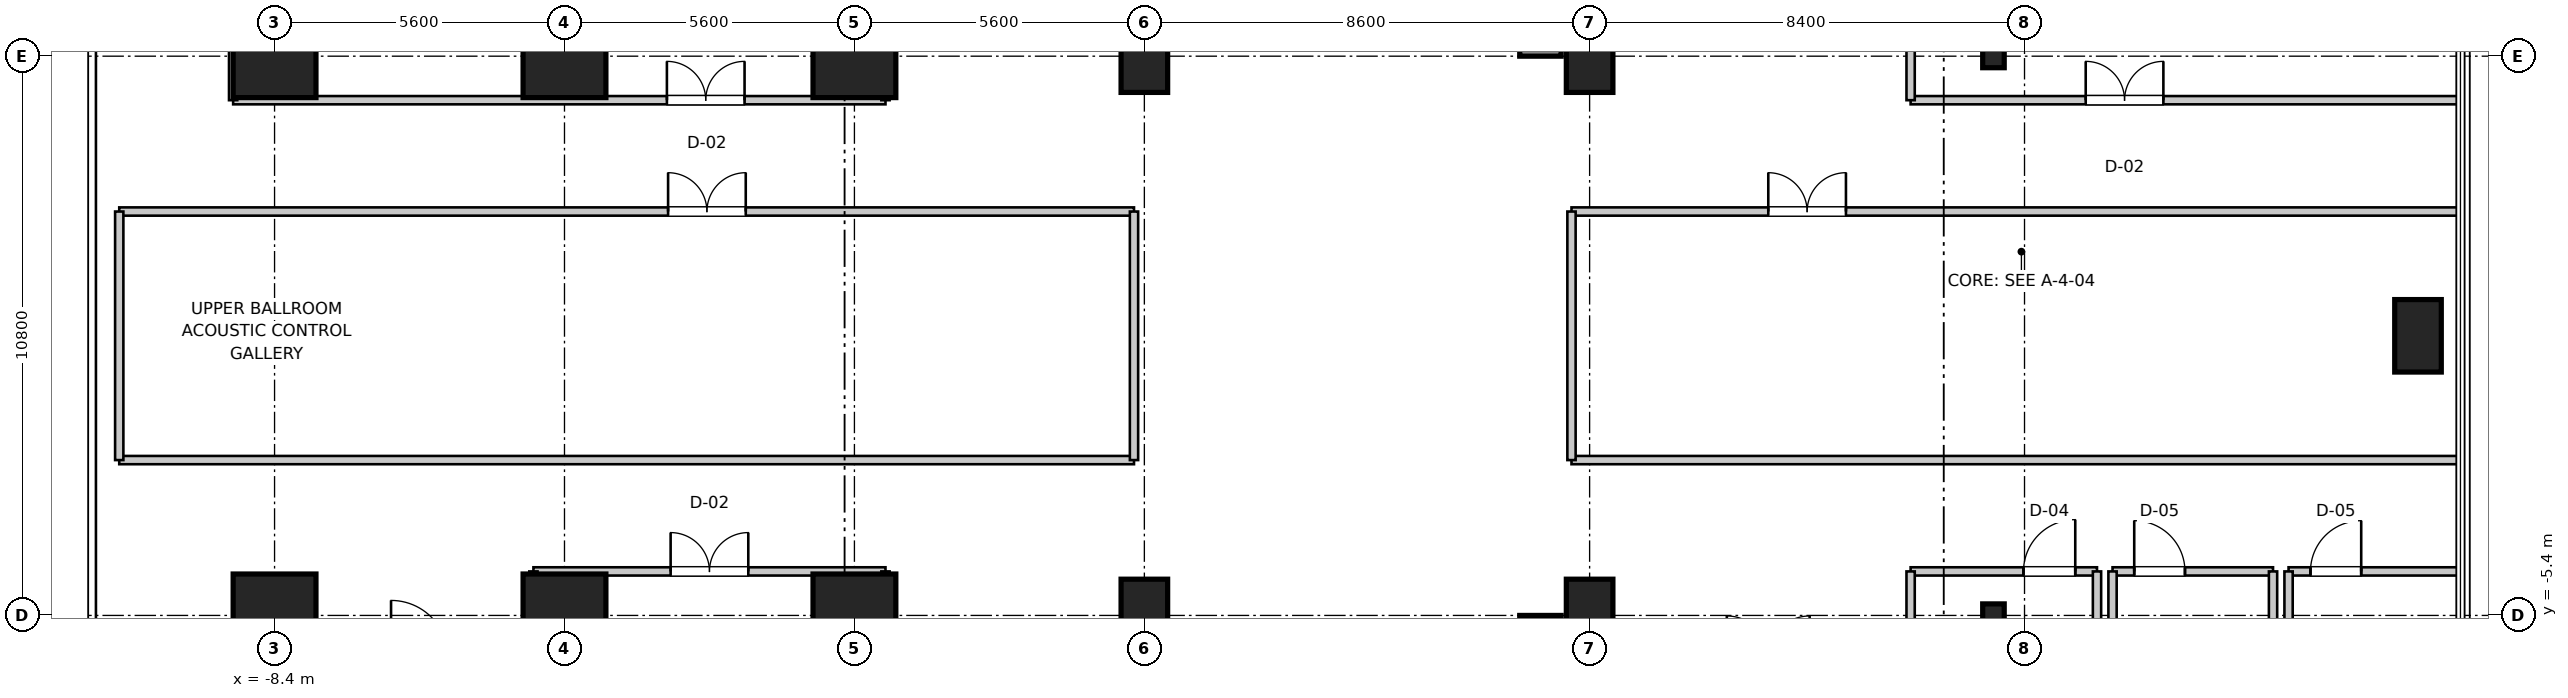
"""IFC4 building model, lengths in metres.
Left out: names, types, materials, properties, quantities, classifications, styles, units other than length and angle.
Written with IfcOpenShell. Run it as: python <this file> out.ifc"""

import sys

from ifc_helpers import new_model, si_unit, direction, frame, frame_2d, origin, origin_2d, place, context, subcontext, project, spatial, rectangle, i_section, extrude, source, transform, mapped, element, fill, save


model = new_model("IFC4")
c1 = context("Model", 3, precision=1e-05, world=origin(), true_north=direction((0.0, 1.0)))
c2 = subcontext(c1, "Body", "Model", "MODEL_VIEW")
j1 = project(units=[si_unit("LENGTHUNIT", "METRE"), si_unit("PLANEANGLEUNIT", "RADIAN")], contexts=[c1])
p1 = place(None, origin())
s1 = spatial("IfcSite", under=j1, at=p1, CompositionType="ELEMENT")
p2 = place(p1, origin())
s2 = spatial("IfcBuilding", under=s1, at=p2, CompositionType="ELEMENT")
p3 = place(p2, frame((0.0, 0.0, 21.6)))
s3 = spatial("IfcBuildingStorey", under=s2, at=p3, CompositionType="ELEMENT", Elevation=21.6)
m1 = source(origin(), c2, "Body", "SweptSolid", [
    extrude(rectangle(XDim=1.6, YDim=1.6, at=origin_2d()), origin(), (0.0, 0.0, 1.0), 5.355),
])
for number, where, z_axis, x_axis in (
    (1, (-8.4, -5.4, 0.0), (0.0, 0.0, 1.0), (1.0, 0.0, 0.0)),
    (2, (-8.4, 5.4, 0.0), (0.0, 0.0, 1.0), (1.0, 0.0, 0.0)),
    (3, (-2.8, -5.4, 0.0), (0.0, 0.0, 1.0), (1.0, 0.0, 0.0)),
    (4, (-2.8, 5.4, 0.0), (0.0, 0.0, 1.0), (1.0, 0.0, 0.0)),
    (5, (2.8, -5.4, 0.0), (0.0, 0.0, 1.0), (1.0, 0.0, 0.0)),
    (6, (2.8, 5.4, 0.0), (0.0, 0.0, 1.0), (1.0, 0.0, 0.0)),
):
    element("IfcColumn", number, at=place(p3, frame(where, z_axis=z_axis, x_axis=x_axis)), inside=s3, PredefinedType="COLUMN", context=c2, shape_type="MappedRepresentation", body=[
        mapped(m1, transform((0.0, 0.0, 0.0), scale=1.0)),
    ])
m2 = source(origin(), c2, "Body", "SweptSolid", [
    extrude(rectangle(XDim=0.9, YDim=1.4, at=origin_2d()), origin(), (0.0, 0.0, 1.0), 5.355),
])
for number, where, z_axis, x_axis in (
    (7, (8.4, -5.4, 0.0), (0.0, 0.0, 1.0), (1.0, 0.0, 0.0)),
    (8, (8.4, 5.4, 0.0), (0.0, 0.0, 1.0), (1.0, 0.0, 0.0)),
    (9, (17.0, -5.4, 0.0), (0.0, 0.0, 1.0), (1.0, 0.0, 0.0)),
    (10, (17.0, 5.4, 0.0), (0.0, 0.0, 1.0), (1.0, 0.0, 0.0)),
    (11, (33.0, 0.0, 0.0), (0.0, 0.0, 1.0), (1.0, 0.0, 0.0)),
):
    element("IfcColumn", number, at=place(p3, frame(where, z_axis=z_axis, x_axis=x_axis)), inside=s3, PredefinedType="PILASTER", context=c2, shape_type="MappedRepresentation", body=[
        mapped(m2, transform((0.0, 0.0, 0.0), scale=1.0)),
    ])
m3 = source(origin(), c2, "Body", "SweptSolid", [
    extrude(i_section(OverallWidth=0.416, OverallDepth=0.446, WebThickness=0.025, FlangeThickness=0.04, at=origin_2d()), origin(), (0.0, 0.0, 1.0), 5.255),
])
for number, where, z_axis, x_axis in (
    (12, (24.8, -5.4, 0.0), (0.0, 0.0, 1.0), (1.0, 0.0, 0.0)),
    (13, (24.8, 5.4, 0.0), (0.0, 0.0, 1.0), (1.0, 0.0, 0.0)),
):
    element("IfcColumn", number, at=place(p3, frame(where, z_axis=z_axis, x_axis=x_axis)), inside=s3, PredefinedType="COLUMN", context=c2, shape_type="MappedRepresentation", body=[
        mapped(m3, transform((0.0, 0.0, 0.0), scale=1.0)),
    ])
m4 = source(origin(), c2, "Body", "SweptSolid", [
    extrude(rectangle(XDim=11.6, YDim=0.8, at=frame_2d((5.8, 0.0))), origin(), (0.0, 0.0, 1.0), 4.98),
])
for number, where, z_axis, x_axis in (
    (14, (16.05, 5.4, 0.0), (0.0, 0.0, 1.0), (0.0, 1.0, 0.0)),
    (15, (16.05, -17.0, 0.0), (0.0, 0.0, 1.0), (0.0, 1.0, 0.0)),
):
    element("IfcWall", number, at=place(p3, frame(where, z_axis=z_axis, x_axis=x_axis)), inside=s3, PredefinedType="SHEAR", context=c2, shape_type="MappedRepresentation", body=[
        mapped(m4, transform((0.0, 0.0, 0.0), scale=1.0)),
    ])
m5 = source(origin(), c2, "Body", "SweptSolid", [
    extrude(rectangle(XDim=19.6, YDim=0.16, at=frame_2d((9.8, 0.0))), origin(), (0.0, 0.0, 1.0), 3.1),
])
p4 = place(p3, frame((-11.4, -2.4, 0.0), z_axis=(0.0, 0.0, 1.0), x_axis=(1.0, 0.0, 0.0)))
e16 = element("IfcWall", 16, at=p4, inside=s3, PredefinedType="PARTITIONING", context=c2, shape_type="MappedRepresentation", body=[
    mapped(m5, transform((0.0, 0.0, 0.0), scale=1.0)),
])
p5 = place(p3, frame((-11.4, 2.4, 0.0), z_axis=(0.0, 0.0, 1.0), x_axis=(1.0, 0.0, 0.0)))
e17 = element("IfcWall", 17, at=p5, inside=s3, PredefinedType="PARTITIONING", context=c2, shape_type="MappedRepresentation", body=[
    mapped(m5, transform((0.0, 0.0, 0.0), scale=1.0)),
])
p6 = place(p5, frame((10.601, 0.0, 0.0)))
e18 = element("IfcOpeningElement", 18, at=p6, cuts=e17, PredefinedType="OPENING", context=c2, shape_type="SweptSolid", body=[
    extrude(rectangle(XDim=1.5, YDim=2.15, at=frame_2d((0.75, 1.075))), frame((0.0, 0.09, 0.0), z_axis=(0.0, -1.0, 0.0), x_axis=(1.0, 0.0, 0.0)), (0.0, 0.0, 1.0), 0.18),
])
m6 = source(origin(), c2, "Body", "SweptSolid", [
    extrude(rectangle(XDim=4.8, YDim=0.16, at=frame_2d((2.4, 0.0))), origin(), (0.0, 0.0, 1.0), 3.1),
])
for number, where, z_axis, x_axis in (
    (19, (-11.4, -2.4, 0.0), (0.0, 0.0, 1.0), (0.0, 1.0, 0.0)),
    (20, (8.2, -2.4, 0.0), (0.0, 0.0, 1.0), (0.0, 1.0, 0.0)),
):
    element("IfcWall", number, at=place(p3, frame(where, z_axis=z_axis, x_axis=x_axis)), inside=s3, PredefinedType="PARTITIONING", context=c2, shape_type="MappedRepresentation", body=[
        mapped(m6, transform((0.0, 0.0, 0.0), scale=1.0)),
    ])
m7 = source(origin(), c2, "Body", "SweptSolid", [
    extrude(rectangle(XDim=17.11, YDim=0.16, at=frame_2d((8.555, 0.0))), origin(), (0.0, 0.0, 1.0), 3.1),
])
p7 = place(p3, frame((16.65, -2.4, 0.0), z_axis=(0.0, 0.0, 1.0), x_axis=(1.0, 0.0, 0.0)))
e21 = element("IfcWall", 21, at=p7, inside=s3, PredefinedType="PARTITIONING", context=c2, shape_type="MappedRepresentation", body=[
    mapped(m7, transform((0.0, 0.0, 0.0), scale=1.0)),
])
p8 = place(p3, frame((16.65, 2.4, 0.0), z_axis=(0.0, 0.0, 1.0), x_axis=(1.0, 0.0, 0.0)))
e22 = element("IfcWall", 22, at=p8, inside=s3, PredefinedType="PARTITIONING", context=c2, shape_type="MappedRepresentation", body=[
    mapped(m7, transform((0.0, 0.0, 0.0), scale=1.0)),
])
p9 = place(p8, frame((3.801, 0.0, 0.0)))
e23 = element("IfcOpeningElement", 23, at=p9, cuts=e22, PredefinedType="OPENING", context=c2, shape_type="SweptSolid", body=[
    extrude(rectangle(XDim=1.5, YDim=2.15, at=frame_2d((0.75, 1.075))), frame((0.0, 0.09, 0.0), z_axis=(0.0, -1.0, 0.0), x_axis=(1.0, 0.0, 0.0)), (0.0, 0.0, 1.0), 0.18),
])
p10 = place(p3, frame((16.65, -2.4, 0.0), z_axis=(0.0, 0.0, 1.0), x_axis=(0.0, 1.0, 0.0)))
e24 = element("IfcWall", 24, at=p10, inside=s3, PredefinedType="PARTITIONING", context=c2, shape_type="MappedRepresentation", body=[
    mapped(m6, transform((0.0, 0.0, 0.0), scale=1.0)),
])
m8 = source(origin(), c2, "Body", "SweptSolid", [
    extrude(rectangle(XDim=12.6, YDim=0.16, at=frame_2d((6.3, 0.0))), origin(), (0.0, 0.0, 1.0), 3.1),
])
p11 = place(p3, frame((-9.2, 4.55, 0.0), z_axis=(0.0, 0.0, 1.0), x_axis=(1.0, 0.0, 0.0)))
e25 = element("IfcWall", 25, at=p11, inside=s3, PredefinedType="PARTITIONING", context=c2, shape_type="MappedRepresentation", body=[
    mapped(m8, transform((0.0, 0.0, 0.0), scale=1.0)),
])
p12 = place(p11, frame((8.378, 0.0, 0.0)))
e26 = element("IfcOpeningElement", 26, at=p12, cuts=e25, PredefinedType="OPENING", context=c2, shape_type="SweptSolid", body=[
    extrude(rectangle(XDim=1.5, YDim=2.15, at=frame_2d((0.75, 1.075))), frame((0.0, 0.09, 0.0), z_axis=(0.0, -1.0, 0.0), x_axis=(1.0, 0.0, 0.0)), (0.0, 0.0, 1.0), 0.18),
])
m9 = source(origin(), c2, "Body", "SweptSolid", [
    extrude(rectangle(XDim=18.71, YDim=0.16, at=frame_2d((9.355, 0.0))), origin(), (0.0, 0.0, 1.0), 3.1),
])
for number, where, z_axis, x_axis in (
    (27, (-9.2, 4.55, 0.0), (0.0, 0.0, 1.0), (0.0, 1.0, 0.0)),
    (28, (3.4, 4.55, 0.0), (0.0, 0.0, 1.0), (0.0, 1.0, 0.0)),
):
    element("IfcWall", number, at=place(p3, frame(where, z_axis=z_axis, x_axis=x_axis)), inside=s3, PredefinedType="PARTITIONING", context=c2, shape_type="MappedRepresentation", body=[
        mapped(m9, transform((0.0, 0.0, 0.0), scale=1.0)),
    ])
m10 = source(origin(), c2, "Body", "SweptSolid", [
    extrude(rectangle(XDim=6.8, YDim=0.16, at=frame_2d((3.4, 0.0))), origin(), (0.0, 0.0, 1.0), 3.1),
])
p13 = place(p3, frame((-3.4, -4.55, 0.0), z_axis=(0.0, 0.0, 1.0), x_axis=(1.0, 0.0, 0.0)))
e29 = element("IfcWall", 29, at=p13, inside=s3, PredefinedType="PARTITIONING", context=c2, shape_type="MappedRepresentation", body=[
    mapped(m10, transform((0.0, 0.0, 0.0), scale=1.0)),
])
p14 = place(p13, frame((2.65, 0.0, 0.0)))
e30 = element("IfcOpeningElement", 30, at=p14, cuts=e29, PredefinedType="OPENING", context=c2, shape_type="SweptSolid", body=[
    extrude(rectangle(XDim=1.5, YDim=2.15, at=frame_2d((0.75, 1.075))), frame((0.0, 0.09, 0.0), z_axis=(0.0, -1.0, 0.0), x_axis=(1.0, 0.0, 0.0)), (0.0, 0.0, 1.0), 0.18),
])
for number, where, z_axis, x_axis in (
    (31, (-3.4, -23.26, 0.0), (0.0, 0.0, 1.0), (0.0, 1.0, 0.0)),
    (32, (3.4, -23.26, 0.0), (0.0, 0.0, 1.0), (0.0, 1.0, 0.0)),
):
    element("IfcWall", number, at=place(p3, frame(where, z_axis=z_axis, x_axis=x_axis)), inside=s3, PredefinedType="PARTITIONING", context=c2, shape_type="MappedRepresentation", body=[
        mapped(m9, transform((0.0, 0.0, 0.0), scale=1.0)),
    ])
m11 = source(origin(), c2, "Body", "SweptSolid", [
    extrude(rectangle(XDim=10.56, YDim=0.16, at=frame_2d((5.28, 0.0))), origin(), (0.0, 0.0, 1.0), 3.1),
])
p15 = place(p3, frame((23.2, 4.55, 0.0), z_axis=(0.0, 0.0, 1.0), x_axis=(1.0, 0.0, 0.0)))
e33 = element("IfcWall", 33, at=p15, inside=s3, PredefinedType="PARTITIONING", context=c2, shape_type="MappedRepresentation", body=[
    mapped(m11, transform((0.0, 0.0, 0.0), scale=1.0)),
])
p16 = place(p15, frame((3.382, 0.0, 0.0)))
e34 = element("IfcOpeningElement", 34, at=p16, cuts=e33, PredefinedType="OPENING", context=c2, shape_type="SweptSolid", body=[
    extrude(rectangle(XDim=1.5, YDim=2.15, at=frame_2d((0.75, 1.075))), frame((0.0, 0.09, 0.0), z_axis=(0.0, -1.0, 0.0), x_axis=(1.0, 0.0, 0.0)), (0.0, 0.0, 1.0), 0.18),
])
p17 = place(p3, frame((23.2, 4.55, 0.0), z_axis=(0.0, 0.0, 1.0), x_axis=(0.0, 1.0, 0.0)))
e35 = element("IfcWall", 35, at=p17, inside=s3, PredefinedType="PARTITIONING", context=c2, shape_type="MappedRepresentation", body=[
    mapped(m9, transform((0.0, 0.0, 0.0), scale=1.0)),
])
m12 = source(origin(), c2, "Body", "SweptSolid", [
    extrude(rectangle(XDim=3.6, YDim=0.16, at=frame_2d((1.8, 0.0))), origin(), (0.0, 0.0, 1.0), 3.1),
])
p18 = place(p3, frame((23.2, -4.55, 0.0), z_axis=(0.0, 0.0, 1.0), x_axis=(1.0, 0.0, 0.0)))
e36 = element("IfcWall", 36, at=p18, inside=s3, PredefinedType="PARTITIONING", context=c2, shape_type="MappedRepresentation", body=[
    mapped(m12, transform((0.0, 0.0, 0.0), scale=1.0)),
])
p19 = place(p18, frame((2.18, 0.0, 0.0)))
e37 = element("IfcOpeningElement", 37, at=p19, cuts=e36, PredefinedType="OPENING", context=c2, shape_type="SweptSolid", body=[
    extrude(rectangle(XDim=1.0, YDim=2.1, at=frame_2d((0.5, 1.05))), frame((0.0, 0.09, 0.0), z_axis=(0.0, -1.0, 0.0), x_axis=(1.0, 0.0, 0.0)), (0.0, 0.0, 1.0), 0.18),
])
for number, where, z_axis, x_axis in (
    (38, (23.2, -23.26, 0.0), (0.0, 0.0, 1.0), (0.0, 1.0, 0.0)),
    (39, (26.8, -23.26, 0.0), (0.0, 0.0, 1.0), (0.0, 1.0, 0.0)),
):
    element("IfcWall", number, at=place(p3, frame(where, z_axis=z_axis, x_axis=x_axis)), inside=s3, PredefinedType="PARTITIONING", context=c2, shape_type="MappedRepresentation", body=[
        mapped(m9, transform((0.0, 0.0, 0.0), scale=1.0)),
    ])
m13 = source(origin(), c2, "Body", "SweptSolid", [
    extrude(rectangle(XDim=3.1, YDim=0.16, at=frame_2d((1.55, 0.0))), origin(), (0.0, 0.0, 1.0), 3.1),
])
p20 = place(p3, frame((27.1, -4.55, 0.0), z_axis=(0.0, 0.0, 1.0), x_axis=(1.0, 0.0, 0.0)))
e40 = element("IfcWall", 40, at=p20, inside=s3, PredefinedType="PARTITIONING", context=c2, shape_type="MappedRepresentation", body=[
    mapped(m13, transform((0.0, 0.0, 0.0), scale=1.0)),
])
p21 = place(p20, frame((0.419, 0.0, 0.0)))
e41 = element("IfcOpeningElement", 41, at=p21, cuts=e40, PredefinedType="OPENING", context=c2, shape_type="SweptSolid", body=[
    extrude(rectangle(XDim=0.98, YDim=2.1, at=frame_2d((0.49, 1.05))), frame((0.0, 0.09, 0.0), z_axis=(0.0, -1.0, 0.0), x_axis=(1.0, 0.0, 0.0)), (0.0, 0.0, 1.0), 0.18),
])
m14 = source(origin(), c2, "Body", "SweptSolid", [
    extrude(rectangle(XDim=7.45, YDim=0.16, at=frame_2d((3.725, 0.0))), origin(), (0.0, 0.0, 1.0), 3.1),
])
for number, where, z_axis, x_axis in (
    (42, (27.1, -12.0, 0.0), (0.0, 0.0, 1.0), (0.0, 1.0, 0.0)),
    (43, (30.2, -12.0, 0.0), (0.0, 0.0, 1.0), (0.0, 1.0, 0.0)),
):
    element("IfcWall", number, at=place(p3, frame(where, z_axis=z_axis, x_axis=x_axis)), inside=s3, PredefinedType="PARTITIONING", context=c2, shape_type="MappedRepresentation", body=[
        mapped(m14, transform((0.0, 0.0, 0.0), scale=1.0)),
    ])
m15 = source(origin(), c2, "Body", "SweptSolid", [
    extrude(rectangle(XDim=3.26, YDim=0.16, at=frame_2d((1.63, 0.0))), origin(), (0.0, 0.0, 1.0), 3.1),
])
p22 = place(p3, frame((30.5, -4.55, 0.0), z_axis=(0.0, 0.0, 1.0), x_axis=(1.0, 0.0, 0.0)))
e44 = element("IfcWall", 44, at=p22, inside=s3, PredefinedType="PARTITIONING", context=c2, shape_type="MappedRepresentation", body=[
    mapped(m15, transform((0.0, 0.0, 0.0), scale=1.0)),
])
p23 = place(p22, frame((0.423, 0.0, 0.0)))
e45 = element("IfcOpeningElement", 45, at=p23, cuts=e44, PredefinedType="OPENING", context=c2, shape_type="SweptSolid", body=[
    extrude(rectangle(XDim=0.98, YDim=2.1, at=frame_2d((0.49, 1.05))), frame((0.0, 0.09, 0.0), z_axis=(0.0, -1.0, 0.0), x_axis=(1.0, 0.0, 0.0)), (0.0, 0.0, 1.0), 0.18),
])
m16 = source(origin(), c2, "Body", "SweptSolid", [
    extrude(rectangle(XDim=5.95, YDim=0.16, at=frame_2d((2.975, 0.0))), origin(), (0.0, 0.0, 1.0), 3.1),
])
p24 = place(p3, frame((30.5, -10.5, 0.0), z_axis=(0.0, 0.0, 1.0), x_axis=(0.0, 1.0, 0.0)))
e46 = element("IfcWall", 46, at=p24, inside=s3, PredefinedType="PARTITIONING", context=c2, shape_type="MappedRepresentation", body=[
    mapped(m16, transform((0.0, 0.0, 0.0), scale=1.0)),
])
m17 = source(origin(), c2, "Body", "SweptSolid", [
    extrude(rectangle(XDim=1.5, YDim=2.15, at=frame_2d((0.75, 1.075))), frame((0.0, 0.025, 0.0), z_axis=(0.0, -1.0, 0.0), x_axis=(1.0, 0.0, 0.0)), (0.0, 0.0, 1.0), 0.05),
])
p25 = place(p6, frame((1.5, 0.0, 0.0), z_axis=(0.0, 0.0, 1.0), x_axis=(-1.0, 0.0, 0.0)))
e47 = element("IfcDoor", 47, at=p25, inside=s3, OperationType="DOUBLE_DOOR_SINGLE_SWING", PredefinedType="DOOR", context=c2, shape_type="MappedRepresentation", body=[
    mapped(m17, transform((0.0, 0.0, 0.0), scale=1.0)),
])
fill(e18, e47)
p26 = place(p9, frame((1.5, 0.0, 0.0), z_axis=(0.0, 0.0, 1.0), x_axis=(-1.0, 0.0, 0.0)))
e48 = element("IfcDoor", 48, at=p26, inside=s3, OperationType="DOUBLE_DOOR_SINGLE_SWING", PredefinedType="DOOR", context=c2, shape_type="MappedRepresentation", body=[
    mapped(m17, transform((0.0, 0.0, 0.0), scale=1.0)),
])
fill(e23, e48)
p27 = place(p12, origin())
e49 = element("IfcDoor", 49, at=p27, inside=s3, OperationType="DOUBLE_DOOR_SINGLE_SWING", PredefinedType="DOOR", context=c2, shape_type="MappedRepresentation", body=[
    mapped(m17, transform((0.0, 0.0, 0.0), scale=1.0)),
])
fill(e26, e49)
p28 = place(p14, frame((1.5, 0.0, 0.0), z_axis=(0.0, 0.0, 1.0), x_axis=(-1.0, 0.0, 0.0)))
e50 = element("IfcDoor", 50, at=p28, inside=s3, OperationType="DOUBLE_DOOR_SINGLE_SWING", PredefinedType="DOOR", context=c2, shape_type="MappedRepresentation", body=[
    mapped(m17, transform((0.0, 0.0, 0.0), scale=1.0)),
])
fill(e30, e50)
p29 = place(p16, origin())
e51 = element("IfcDoor", 51, at=p29, inside=s3, OperationType="DOUBLE_DOOR_SINGLE_SWING", PredefinedType="DOOR", context=c2, shape_type="MappedRepresentation", body=[
    mapped(m17, transform((0.0, 0.0, 0.0), scale=1.0)),
])
fill(e34, e51)
m18 = source(origin(), c2, "Body", "SweptSolid", [
    extrude(rectangle(XDim=1.0, YDim=2.1, at=frame_2d((0.5, 1.05))), frame((0.0, 0.025, 0.0), z_axis=(0.0, -1.0, 0.0), x_axis=(1.0, 0.0, 0.0)), (0.0, 0.0, 1.0), 0.05),
])
p30 = place(p19, frame((1.0, 0.0, 0.0), z_axis=(0.0, 0.0, 1.0), x_axis=(-1.0, 0.0, 0.0)))
e52 = element("IfcDoor", 52, at=p30, inside=s3, OperationType="SINGLE_SWING_RIGHT", PredefinedType="DOOR", context=c2, shape_type="MappedRepresentation", body=[
    mapped(m18, transform((0.0, 0.0, 0.0), scale=1.0)),
])
fill(e37, e52)
m19 = source(origin(), c2, "Body", "SweptSolid", [
    extrude(rectangle(XDim=0.98, YDim=2.1, at=frame_2d((0.49, 1.05))), frame((0.0, 0.025, 0.0), z_axis=(0.0, -1.0, 0.0), x_axis=(1.0, 0.0, 0.0)), (0.0, 0.0, 1.0), 0.05),
])
p31 = place(p21, frame((0.98, 0.0, 0.0), z_axis=(0.0, 0.0, 1.0), x_axis=(-1.0, 0.0, 0.0)))
e53 = element("IfcDoor", 53, at=p31, inside=s3, OperationType="SINGLE_SWING_LEFT", PredefinedType="DOOR", context=c2, shape_type="MappedRepresentation", body=[
    mapped(m19, transform((0.0, 0.0, 0.0), scale=1.0)),
])
fill(e41, e53)
p32 = place(p23, frame((0.98, 0.0, 0.0), z_axis=(0.0, 0.0, 1.0), x_axis=(-1.0, 0.0, 0.0)))
e54 = element("IfcDoor", 54, at=p32, inside=s3, OperationType="SINGLE_SWING_RIGHT", PredefinedType="DOOR", context=c2, shape_type="MappedRepresentation", body=[
    mapped(m19, transform((0.0, 0.0, 0.0), scale=1.0)),
])
fill(e45, e54)
save(model, sys.argv[1])
